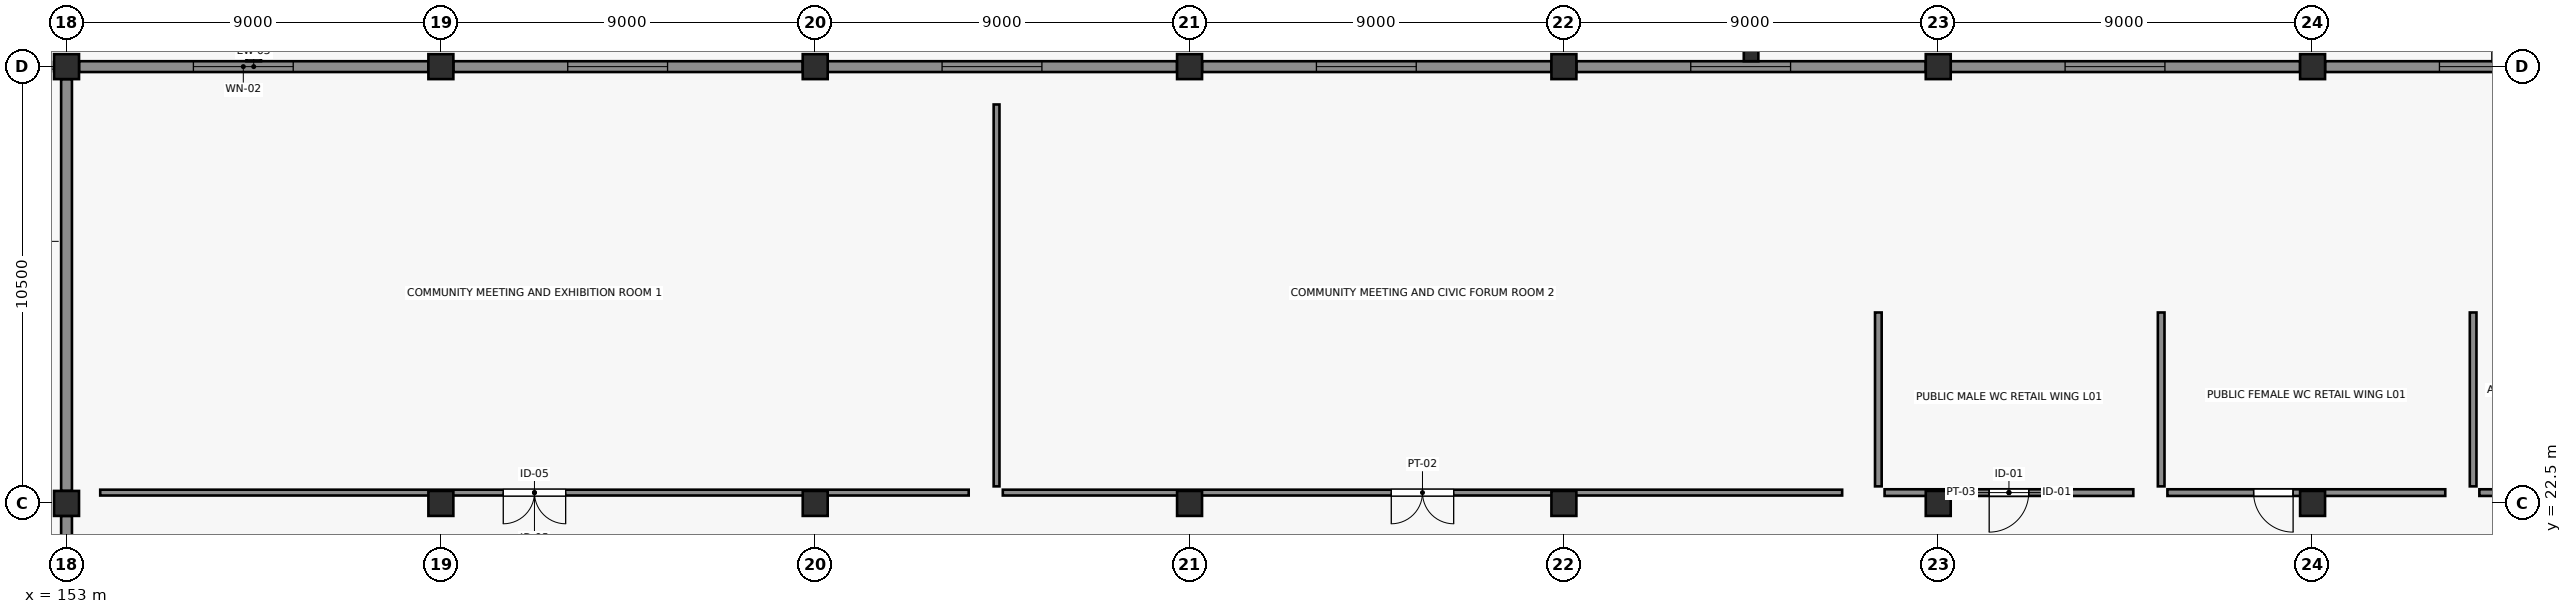
"""IFC4 building model, lengths in metres.
Left out: names, types, materials, properties, quantities, classifications, styles, units other than length and angle.
Written with IfcOpenShell. Run it as: python <this file> out.ifc"""

import sys

from ifc_helpers import new_model, si_unit, direction, frame, frame_2d, origin, origin_2d, place, context, subcontext, project, spatial, rectangle, extrude, element, fill, save


model = new_model("IFC4")
c1 = context("Model", 3, precision=1e-05, world=origin(), true_north=direction((0.0, 1.0)))
c2 = subcontext(c1, "Body", "Model", "MODEL_VIEW")
j1 = project(units=[si_unit("LENGTHUNIT", "METRE"), si_unit("PLANEANGLEUNIT", "RADIAN")], contexts=[c1])
p1 = place(None, origin())
s1 = spatial("IfcSite", under=j1, at=p1, CompositionType="ELEMENT")
p2 = place(p1, origin())
s2 = spatial("IfcBuilding", under=s1, at=p2, CompositionType="ELEMENT")
p3 = place(p2, frame((0.0, 0.0, 4.8)))
s3 = spatial("IfcBuildingStorey", under=s2, at=p3, CompositionType="ELEMENT", Elevation=4.8)
for number, where, z_axis, x_axis in (
    (1, (153.0, 22.5, 0.0), (0.0, 0.0, 1.0), (1.0, 0.0, 0.0)),
    (2, (153.0, 33.0, 0.0), (0.0, 0.0, 1.0), (1.0, 0.0, 0.0)),
    (3, (162.0, 22.5, 0.0), (0.0, 0.0, 1.0), (1.0, 0.0, 0.0)),
    (4, (162.0, 33.0, 0.0), (0.0, 0.0, 1.0), (1.0, 0.0, 0.0)),
    (5, (171.0, 22.5, 0.0), (0.0, 0.0, 1.0), (1.0, 0.0, 0.0)),
    (6, (171.0, 33.0, 0.0), (0.0, 0.0, 1.0), (1.0, 0.0, 0.0)),
    (7, (180.0, 22.5, 0.0), (0.0, 0.0, 1.0), (1.0, 0.0, 0.0)),
    (8, (180.0, 33.0, 0.0), (0.0, 0.0, 1.0), (1.0, 0.0, 0.0)),
    (9, (189.0, 22.5, 0.0), (0.0, 0.0, 1.0), (1.0, 0.0, 0.0)),
    (10, (189.0, 33.0, 0.0), (0.0, 0.0, 1.0), (1.0, 0.0, 0.0)),
    (11, (198.0, 22.5, 0.0), (0.0, 0.0, 1.0), (1.0, 0.0, 0.0)),
    (12, (198.0, 33.0, 0.0), (0.0, 0.0, 1.0), (1.0, 0.0, 0.0)),
    (13, (207.0, 22.5, 0.0), (0.0, 0.0, 1.0), (1.0, 0.0, 0.0)),
    (14, (207.0, 33.0, 0.0), (0.0, 0.0, 1.0), (1.0, 0.0, 0.0)),
):
    element("IfcColumn", number, at=place(p3, frame(where, z_axis=z_axis, x_axis=x_axis)), inside=s3, PredefinedType="COLUMN", context=c2, shape_type="SweptSolid", body=[
        extrude(rectangle(XDim=0.6, YDim=0.6, at=origin_2d()), origin(), (0.0, 0.0, 1.0), 4.815),
    ])
for number, where, z_axis, x_axis in (
    (15, (157.5, 33.38, 0.0), (0.0, 0.0, 1.0), (1.0, 0.0, 0.0)),
    (16, (193.5, 33.38, 0.0), (0.0, 0.0, 1.0), (1.0, 0.0, 0.0)),
    (17, (211.5, 33.38, 0.0), (0.0, 0.0, 1.0), (1.0, 0.0, 0.0)),
):
    element("IfcColumn", number, at=place(p3, frame(where, z_axis=z_axis, x_axis=x_axis)), inside=s3, PredefinedType="PILASTER", context=c2, shape_type="SweptSolid", body=[
        extrude(rectangle(XDim=0.35, YDim=0.5, at=origin_2d()), origin(), (0.0, 0.0, 1.0), 4.815),
    ])
p4 = place(p3, frame((153.3, 33.0, 0.0), z_axis=(0.0, 0.0, 1.0), x_axis=(1.0, 0.0, 0.0)))
e18 = element("IfcWall", 18, at=p4, inside=s3, PredefinedType="SOLIDWALL", context=c2, shape_type="SweptSolid", body=[
    extrude(rectangle(XDim=8.4, YDim=0.26, at=frame_2d((4.2, 0.0))), origin(), (0.0, 0.0, 1.0), 4.35),
])
p5 = place(p4, frame((2.75, 0.0, 1.1)))
e19 = element("IfcOpeningElement", 19, at=p5, cuts=e18, PredefinedType="OPENING", context=c2, shape_type="SweptSolid", body=[
    extrude(rectangle(XDim=2.4, YDim=1.6, at=frame_2d((1.2, 0.8))), frame((0.0, 0.14, 0.0), z_axis=(0.0, -1.0, 0.0), x_axis=(1.0, 0.0, 0.0)), (0.0, 0.0, 1.0), 0.28),
])
p6 = place(p3, frame((162.3, 33.0, 0.0), z_axis=(0.0, 0.0, 1.0), x_axis=(1.0, 0.0, 0.0)))
e20 = element("IfcWall", 20, at=p6, inside=s3, PredefinedType="SOLIDWALL", context=c2, shape_type="SweptSolid", body=[
    extrude(rectangle(XDim=8.4, YDim=0.26, at=frame_2d((4.2, 0.0))), origin(), (0.0, 0.0, 1.0), 4.35),
])
p7 = place(p6, frame((2.75, 0.0, 1.1)))
e21 = element("IfcOpeningElement", 21, at=p7, cuts=e20, PredefinedType="OPENING", context=c2, shape_type="SweptSolid", body=[
    extrude(rectangle(XDim=2.4, YDim=1.6, at=frame_2d((1.2, 0.8))), frame((0.0, 0.14, 0.0), z_axis=(0.0, -1.0, 0.0), x_axis=(1.0, 0.0, 0.0)), (0.0, 0.0, 1.0), 0.28),
])
p8 = place(p3, frame((171.3, 33.0, 0.0), z_axis=(0.0, 0.0, 1.0), x_axis=(1.0, 0.0, 0.0)))
e22 = element("IfcWall", 22, at=p8, inside=s3, PredefinedType="SOLIDWALL", context=c2, shape_type="SweptSolid", body=[
    extrude(rectangle(XDim=8.4, YDim=0.26, at=frame_2d((4.2, 0.0))), origin(), (0.0, 0.0, 1.0), 4.35),
])
p9 = place(p8, frame((2.75, 0.0, 1.1)))
e23 = element("IfcOpeningElement", 23, at=p9, cuts=e22, PredefinedType="OPENING", context=c2, shape_type="SweptSolid", body=[
    extrude(rectangle(XDim=2.4, YDim=1.6, at=frame_2d((1.2, 0.8))), frame((0.0, 0.14, 0.0), z_axis=(0.0, -1.0, 0.0), x_axis=(1.0, 0.0, 0.0)), (0.0, 0.0, 1.0), 0.28),
])
p10 = place(p3, frame((180.3, 33.0, 0.0), z_axis=(0.0, 0.0, 1.0), x_axis=(1.0, 0.0, 0.0)))
e24 = element("IfcWall", 24, at=p10, inside=s3, PredefinedType="SOLIDWALL", context=c2, shape_type="SweptSolid", body=[
    extrude(rectangle(XDim=8.4, YDim=0.26, at=frame_2d((4.2, 0.0))), origin(), (0.0, 0.0, 1.0), 4.35),
])
p11 = place(p10, frame((2.75, 0.0, 1.1)))
e25 = element("IfcOpeningElement", 25, at=p11, cuts=e24, PredefinedType="OPENING", context=c2, shape_type="SweptSolid", body=[
    extrude(rectangle(XDim=2.4, YDim=1.6, at=frame_2d((1.2, 0.8))), frame((0.0, 0.14, 0.0), z_axis=(0.0, -1.0, 0.0), x_axis=(1.0, 0.0, 0.0)), (0.0, 0.0, 1.0), 0.28),
])
p12 = place(p3, frame((189.3, 33.0, 0.0), z_axis=(0.0, 0.0, 1.0), x_axis=(1.0, 0.0, 0.0)))
e26 = element("IfcWall", 26, at=p12, inside=s3, PredefinedType="SOLIDWALL", context=c2, shape_type="SweptSolid", body=[
    extrude(rectangle(XDim=8.4, YDim=0.26, at=frame_2d((4.2, 0.0))), origin(), (0.0, 0.0, 1.0), 4.35),
])
p13 = place(p12, frame((2.75, 0.0, 1.1)))
e27 = element("IfcOpeningElement", 27, at=p13, cuts=e26, PredefinedType="OPENING", context=c2, shape_type="SweptSolid", body=[
    extrude(rectangle(XDim=2.4, YDim=1.6, at=frame_2d((1.2, 0.8))), frame((0.0, 0.14, 0.0), z_axis=(0.0, -1.0, 0.0), x_axis=(1.0, 0.0, 0.0)), (0.0, 0.0, 1.0), 0.28),
])
p14 = place(p3, frame((198.3, 33.0, 0.0), z_axis=(0.0, 0.0, 1.0), x_axis=(1.0, 0.0, 0.0)))
e28 = element("IfcWall", 28, at=p14, inside=s3, PredefinedType="SOLIDWALL", context=c2, shape_type="SweptSolid", body=[
    extrude(rectangle(XDim=8.4, YDim=0.26, at=frame_2d((4.2, 0.0))), origin(), (0.0, 0.0, 1.0), 4.35),
])
p15 = place(p14, frame((2.75, 0.0, 1.1)))
e29 = element("IfcOpeningElement", 29, at=p15, cuts=e28, PredefinedType="OPENING", context=c2, shape_type="SweptSolid", body=[
    extrude(rectangle(XDim=2.4, YDim=1.6, at=frame_2d((1.2, 0.8))), frame((0.0, 0.14, 0.0), z_axis=(0.0, -1.0, 0.0), x_axis=(1.0, 0.0, 0.0)), (0.0, 0.0, 1.0), 0.28),
])
p16 = place(p3, frame((207.3, 33.0, 0.0), z_axis=(0.0, 0.0, 1.0), x_axis=(1.0, 0.0, 0.0)))
e30 = element("IfcWall", 30, at=p16, inside=s3, PredefinedType="SOLIDWALL", context=c2, shape_type="SweptSolid", body=[
    extrude(rectangle(XDim=8.4, YDim=0.26, at=frame_2d((4.2, 0.0))), origin(), (0.0, 0.0, 1.0), 4.35),
])
p17 = place(p16, frame((2.75, 0.0, 1.1)))
e31 = element("IfcOpeningElement", 31, at=p17, cuts=e30, PredefinedType="OPENING", context=c2, shape_type="SweptSolid", body=[
    extrude(rectangle(XDim=2.4, YDim=1.6, at=frame_2d((1.2, 0.8))), frame((0.0, 0.14, 0.0), z_axis=(0.0, -1.0, 0.0), x_axis=(1.0, 0.0, 0.0)), (0.0, 0.0, 1.0), 0.28),
])
p18 = place(p3, frame((153.0, 11.3, 0.0), z_axis=(0.0, 0.0, 1.0), x_axis=(0.0, 1.0, 0.0)))
e32 = element("IfcWall", 32, at=p18, inside=s3, PredefinedType="SOLIDWALL", context=c2, shape_type="SweptSolid", body=[
    extrude(rectangle(XDim=10.9, YDim=0.26, at=frame_2d((5.45, 0.0))), origin(), (0.0, 0.0, 1.0), 4.35),
])
p19 = place(p18, frame((3.2, 0.0, 1.0)))
e33 = element("IfcOpeningElement", 33, at=p19, cuts=e32, PredefinedType="OPENING", context=c2, shape_type="SweptSolid", body=[
    extrude(rectangle(XDim=1.8, YDim=2.1, at=frame_2d((0.9, 1.05))), frame((0.0, 0.14, 0.0), z_axis=(0.0, -1.0, 0.0), x_axis=(1.0, 0.0, 0.0)), (0.0, 0.0, 1.0), 0.28),
])
p20 = place(p3, frame((153.0, 22.8, 0.0), z_axis=(0.0, 0.0, 1.0), x_axis=(0.0, 1.0, 0.0)))
e34 = element("IfcWall", 34, at=p20, inside=s3, PredefinedType="SOLIDWALL", context=c2, shape_type="SweptSolid", body=[
    extrude(rectangle(XDim=9.9, YDim=0.26, at=frame_2d((4.95, 0.0))), origin(), (0.0, 0.0, 1.0), 4.35),
])
p21 = place(p3, frame((174.69, 22.76, 0.0), z_axis=(0.0, 0.0, 1.0), x_axis=(-1.0, 0.0, 0.0)))
e35 = element("IfcWall", 35, at=p21, inside=s3, PredefinedType="PARTITIONING", context=c2, shape_type="SweptSolid", body=[
    extrude(rectangle(XDim=20.88, YDim=0.14, at=frame_2d((10.44, 0.0))), origin(), (0.0, 0.0, 1.0), 4.285),
])
p22 = place(p21, frame((9.69, 0.0, 0.0)))
e36 = element("IfcOpeningElement", 36, at=p22, cuts=e35, PredefinedType="OPENING", context=c2, shape_type="SweptSolid", body=[
    extrude(rectangle(XDim=1.5, YDim=2.2, at=frame_2d((0.75, 1.1))), frame((0.0, 0.08, 0.0), z_axis=(0.0, -1.0, 0.0), x_axis=(1.0, 0.0, 0.0)), (0.0, 0.0, 1.0), 0.16),
])
p23 = place(p3, frame((195.69, 22.76, 0.0), z_axis=(0.0, 0.0, 1.0), x_axis=(-1.0, 0.0, 0.0)))
e37 = element("IfcWall", 37, at=p23, inside=s3, PredefinedType="PARTITIONING", context=c2, shape_type="SweptSolid", body=[
    extrude(rectangle(XDim=20.18, YDim=0.14, at=frame_2d((10.09, 0.0))), origin(), (0.0, 0.0, 1.0), 4.285),
])
p24 = place(p23, frame((9.34, 0.0, 0.0)))
e38 = element("IfcOpeningElement", 38, at=p24, cuts=e37, PredefinedType="OPENING", context=c2, shape_type="SweptSolid", body=[
    extrude(rectangle(XDim=1.5, YDim=2.2, at=frame_2d((0.75, 1.1))), frame((0.0, 0.08, 0.0), z_axis=(0.0, -1.0, 0.0), x_axis=(1.0, 0.0, 0.0)), (0.0, 0.0, 1.0), 0.16),
])
p25 = place(p3, frame((175.36, 22.91, 0.0), z_axis=(0.0, 0.0, 1.0), x_axis=(0.0, 1.0, 0.0)))
e39 = element("IfcWall", 39, at=p25, inside=s3, PredefinedType="PARTITIONING", context=c2, shape_type="SweptSolid", body=[
    extrude(rectangle(XDim=9.18, YDim=0.14, at=frame_2d((4.59, 0.0))), origin(), (0.0, 0.0, 1.0), 4.75),
])
p26 = place(p3, frame((202.69, 22.76, 0.0), z_axis=(0.0, 0.0, 1.0), x_axis=(-1.0, 0.0, 0.0)))
e40 = element("IfcWall", 40, at=p26, inside=s3, PredefinedType="PARTITIONING", context=c2, shape_type="SweptSolid", body=[
    extrude(rectangle(XDim=5.98, YDim=0.16, at=frame_2d((2.99, 0.0))), origin(), (0.0, 0.0, 1.0), 4.285),
])
p27 = place(p26, frame((2.515, 0.0, 0.0)))
e41 = element("IfcOpeningElement", 41, at=p27, cuts=e40, PredefinedType="OPENING", context=c2, shape_type="SweptSolid", body=[
    extrude(rectangle(XDim=0.95, YDim=2.15, at=frame_2d((0.475, 1.075))), frame((0.0, 0.09, 0.0), z_axis=(0.0, -1.0, 0.0), x_axis=(1.0, 0.0, 0.0)), (0.0, 0.0, 1.0), 0.18),
])
p28 = place(p3, frame((196.56, 22.91, 0.0), z_axis=(0.0, 0.0, 1.0), x_axis=(0.0, 1.0, 0.0)))
e42 = element("IfcWall", 42, at=p28, inside=s3, PredefinedType="PARTITIONING", context=c2, shape_type="SweptSolid", body=[
    extrude(rectangle(XDim=4.18, YDim=0.16, at=frame_2d((2.09, 0.0))), origin(), (0.0, 0.0, 1.0), 4.75),
])
p29 = place(p3, frame((210.19, 22.76, 0.0), z_axis=(0.0, 0.0, 1.0), x_axis=(-1.0, 0.0, 0.0)))
e43 = element("IfcWall", 43, at=p29, inside=s3, PredefinedType="PARTITIONING", context=c2, shape_type="SweptSolid", body=[
    extrude(rectangle(XDim=6.68, YDim=0.16, at=frame_2d((3.34, 0.0))), origin(), (0.0, 0.0, 1.0), 4.285),
])
p30 = place(p29, frame((3.658, 0.0, 0.0)))
e44 = element("IfcOpeningElement", 44, at=p30, cuts=e43, PredefinedType="OPENING", context=c2, shape_type="SweptSolid", body=[
    extrude(rectangle(XDim=0.95, YDim=2.15, at=frame_2d((0.475, 1.075))), frame((0.0, 0.09, 0.0), z_axis=(0.0, -1.0, 0.0), x_axis=(1.0, 0.0, 0.0)), (0.0, 0.0, 1.0), 0.18),
])
p31 = place(p3, frame((203.36, 22.91, 0.0), z_axis=(0.0, 0.0, 1.0), x_axis=(0.0, 1.0, 0.0)))
e45 = element("IfcWall", 45, at=p31, inside=s3, PredefinedType="PARTITIONING", context=c2, shape_type="SweptSolid", body=[
    extrude(rectangle(XDim=4.18, YDim=0.16, at=frame_2d((2.09, 0.0))), origin(), (0.0, 0.0, 1.0), 4.75),
])
p32 = place(p3, frame((215.19, 22.76, 0.0), z_axis=(0.0, 0.0, 1.0), x_axis=(-1.0, 0.0, 0.0)))
e46 = element("IfcWall", 46, at=p32, inside=s3, PredefinedType="PARTITIONING", context=c2, shape_type="SweptSolid", body=[
    extrude(rectangle(XDim=4.18, YDim=0.16, at=frame_2d((2.09, 0.0))), origin(), (0.0, 0.0, 1.0), 4.285),
])
p33 = place(p32, frame((1.565, 0.0, 0.0)))
e47 = element("IfcOpeningElement", 47, at=p33, cuts=e46, PredefinedType="OPENING", context=c2, shape_type="SweptSolid", body=[
    extrude(rectangle(XDim=1.05, YDim=2.2, at=frame_2d((0.525, 1.1))), frame((0.0, 0.09, 0.0), z_axis=(0.0, -1.0, 0.0), x_axis=(1.0, 0.0, 0.0)), (0.0, 0.0, 1.0), 0.18),
])
p34 = place(p3, frame((210.86, 22.91, 0.0), z_axis=(0.0, 0.0, 1.0), x_axis=(0.0, 1.0, 0.0)))
e48 = element("IfcWall", 48, at=p34, inside=s3, PredefinedType="PARTITIONING", context=c2, shape_type="SweptSolid", body=[
    extrude(rectangle(XDim=4.18, YDim=0.16, at=frame_2d((2.09, 0.0))), origin(), (0.0, 0.0, 1.0), 4.75),
])
p35 = place(p5, origin())
e49 = element("IfcWindow", 49, at=p35, inside=s3, PartitioningType="SINGLE_PANEL", PredefinedType="WINDOW", context=c2, shape_type="SweptSolid", body=[
    extrude(rectangle(XDim=2.4, YDim=1.6, at=frame_2d((1.2, 0.8))), frame((0.0, 0.03, 0.0), z_axis=(0.0, -1.0, 0.0), x_axis=(1.0, 0.0, 0.0)), (0.0, 0.0, 1.0), 0.06),
])
fill(e19, e49)
p36 = place(p7, origin())
e50 = element("IfcWindow", 50, at=p36, inside=s3, PartitioningType="SINGLE_PANEL", PredefinedType="WINDOW", context=c2, shape_type="SweptSolid", body=[
    extrude(rectangle(XDim=2.4, YDim=1.6, at=frame_2d((1.2, 0.8))), frame((0.0, 0.03, 0.0), z_axis=(0.0, -1.0, 0.0), x_axis=(1.0, 0.0, 0.0)), (0.0, 0.0, 1.0), 0.06),
])
fill(e21, e50)
p37 = place(p9, origin())
e51 = element("IfcWindow", 51, at=p37, inside=s3, PartitioningType="SINGLE_PANEL", PredefinedType="WINDOW", context=c2, shape_type="SweptSolid", body=[
    extrude(rectangle(XDim=2.4, YDim=1.6, at=frame_2d((1.2, 0.8))), frame((0.0, 0.03, 0.0), z_axis=(0.0, -1.0, 0.0), x_axis=(1.0, 0.0, 0.0)), (0.0, 0.0, 1.0), 0.06),
])
fill(e23, e51)
p38 = place(p11, origin())
e52 = element("IfcWindow", 52, at=p38, inside=s3, PartitioningType="SINGLE_PANEL", PredefinedType="WINDOW", context=c2, shape_type="SweptSolid", body=[
    extrude(rectangle(XDim=2.4, YDim=1.6, at=frame_2d((1.2, 0.8))), frame((0.0, 0.03, 0.0), z_axis=(0.0, -1.0, 0.0), x_axis=(1.0, 0.0, 0.0)), (0.0, 0.0, 1.0), 0.06),
])
fill(e25, e52)
p39 = place(p13, origin())
e53 = element("IfcWindow", 53, at=p39, inside=s3, PartitioningType="SINGLE_PANEL", PredefinedType="WINDOW", context=c2, shape_type="SweptSolid", body=[
    extrude(rectangle(XDim=2.4, YDim=1.6, at=frame_2d((1.2, 0.8))), frame((0.0, 0.03, 0.0), z_axis=(0.0, -1.0, 0.0), x_axis=(1.0, 0.0, 0.0)), (0.0, 0.0, 1.0), 0.06),
])
fill(e27, e53)
p40 = place(p15, origin())
e54 = element("IfcWindow", 54, at=p40, inside=s3, PartitioningType="SINGLE_PANEL", PredefinedType="WINDOW", context=c2, shape_type="SweptSolid", body=[
    extrude(rectangle(XDim=2.4, YDim=1.6, at=frame_2d((1.2, 0.8))), frame((0.0, 0.03, 0.0), z_axis=(0.0, -1.0, 0.0), x_axis=(1.0, 0.0, 0.0)), (0.0, 0.0, 1.0), 0.06),
])
fill(e29, e54)
p41 = place(p17, origin())
e55 = element("IfcWindow", 55, at=p41, inside=s3, PartitioningType="SINGLE_PANEL", PredefinedType="WINDOW", context=c2, shape_type="SweptSolid", body=[
    extrude(rectangle(XDim=2.4, YDim=1.6, at=frame_2d((1.2, 0.8))), frame((0.0, 0.03, 0.0), z_axis=(0.0, -1.0, 0.0), x_axis=(1.0, 0.0, 0.0)), (0.0, 0.0, 1.0), 0.06),
])
fill(e31, e55)
p42 = place(p22, origin())
e56 = element("IfcDoor", 56, at=p42, inside=s3, OperationType="DOUBLE_DOOR_SINGLE_SWING", PredefinedType="DOOR", context=c2, shape_type="SweptSolid", body=[
    extrude(rectangle(XDim=1.5, YDim=2.2, at=frame_2d((0.75, 1.1))), frame((0.0, 0.025, 0.0), z_axis=(0.0, -1.0, 0.0), x_axis=(1.0, 0.0, 0.0)), (0.0, 0.0, 1.0), 0.05),
])
fill(e36, e56)
p43 = place(p24, origin())
e57 = element("IfcDoor", 57, at=p43, inside=s3, OperationType="DOUBLE_DOOR_SINGLE_SWING", PredefinedType="DOOR", context=c2, shape_type="SweptSolid", body=[
    extrude(rectangle(XDim=1.5, YDim=2.2, at=frame_2d((0.75, 1.1))), frame((0.0, 0.025, 0.0), z_axis=(0.0, -1.0, 0.0), x_axis=(1.0, 0.0, 0.0)), (0.0, 0.0, 1.0), 0.05),
])
fill(e38, e57)
p44 = place(p27, origin())
e58 = element("IfcDoor", 58, at=p44, inside=s3, OperationType="SINGLE_SWING_RIGHT", PredefinedType="DOOR", context=c2, shape_type="SweptSolid", body=[
    extrude(rectangle(XDim=0.95, YDim=2.15, at=frame_2d((0.475, 1.075))), frame((0.0, 0.025, 0.0), z_axis=(0.0, -1.0, 0.0), x_axis=(1.0, 0.0, 0.0)), (0.0, 0.0, 1.0), 0.05),
])
fill(e41, e58)
p45 = place(p30, origin())
e59 = element("IfcDoor", 59, at=p45, inside=s3, OperationType="SINGLE_SWING_LEFT", PredefinedType="DOOR", context=c2, shape_type="SweptSolid", body=[
    extrude(rectangle(XDim=0.95, YDim=2.15, at=frame_2d((0.475, 1.075))), frame((0.0, 0.025, 0.0), z_axis=(0.0, -1.0, 0.0), x_axis=(1.0, 0.0, 0.0)), (0.0, 0.0, 1.0), 0.05),
])
fill(e44, e59)
save(model, sys.argv[1])
